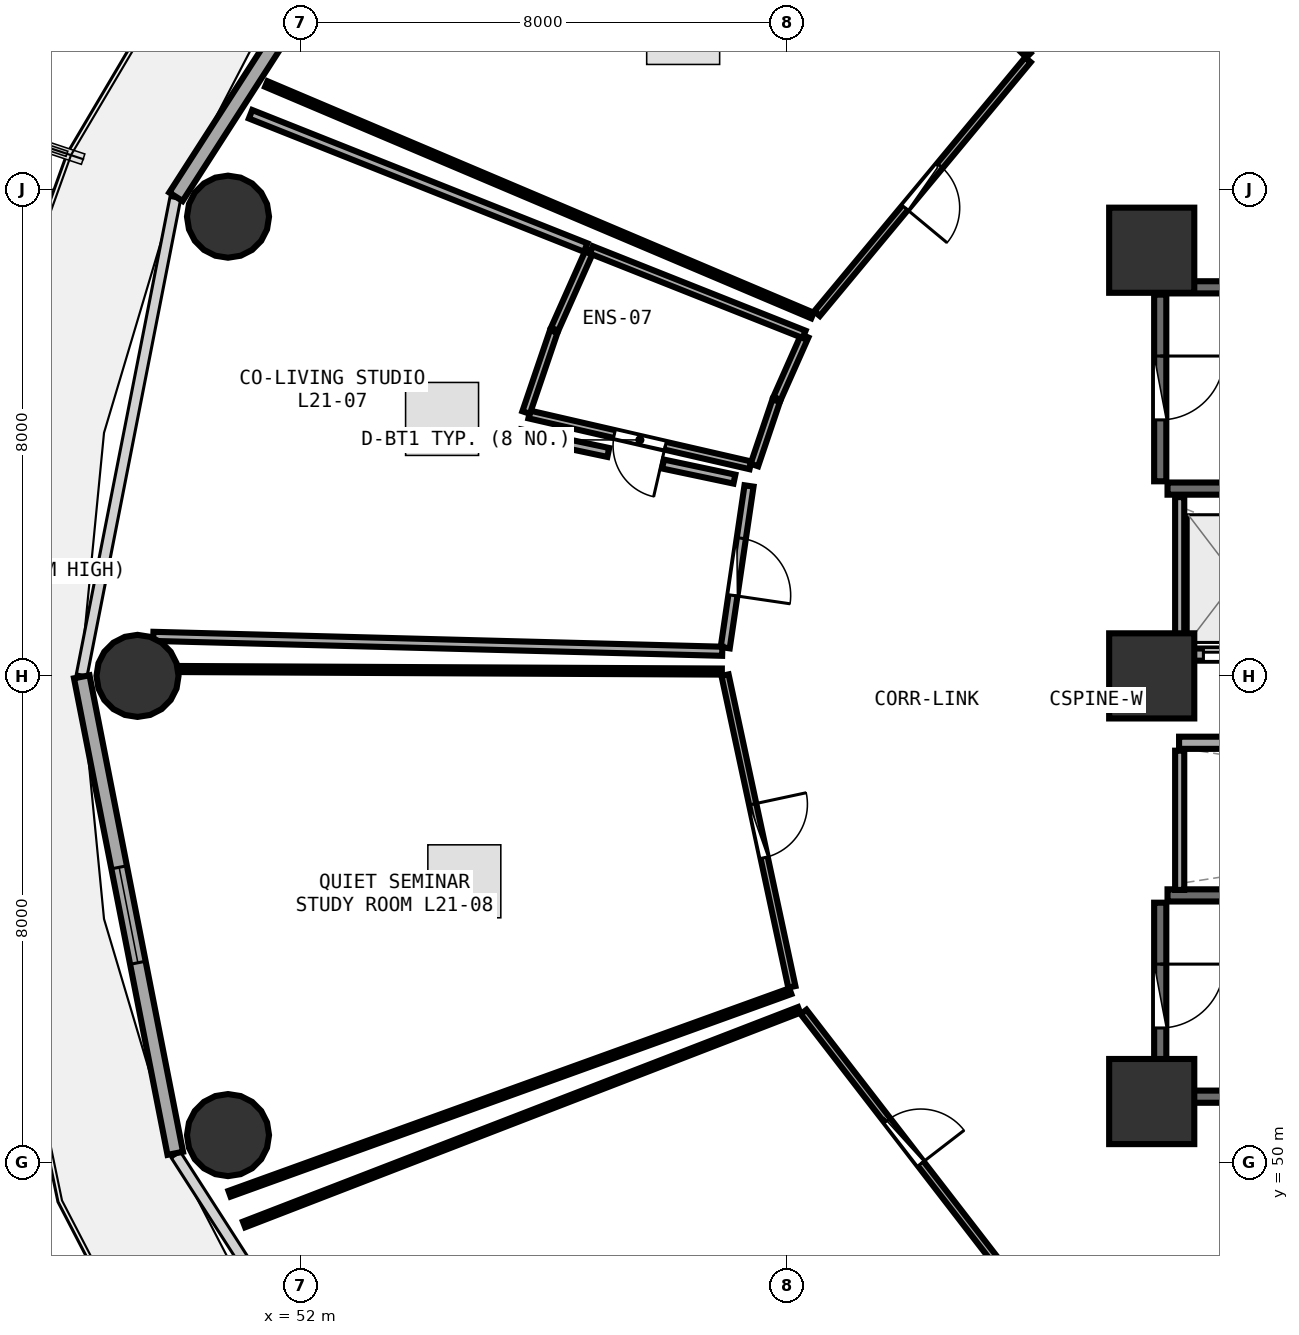
"""IFC4 building model, lengths in metres.
Left out: names, types, materials, properties, quantities, classifications, styles, units other than length and angle.
Written with IfcOpenShell. Run it as: python <this file> out.ifc"""

import sys

from ifc_helpers import new_model, si_unit, direction, frame, frame_2d, origin, origin_2d, place, context, subcontext, project, spatial, rectangle, circle, extrude, element, fill, save


model = new_model("IFC4")
c1 = context("Model", 3, precision=1e-05, world=origin(), true_north=direction((0.0, 1.0)))
c2 = subcontext(c1, "Body", "Model", "MODEL_VIEW")
j1 = project(units=[si_unit("LENGTHUNIT", "METRE"), si_unit("PLANEANGLEUNIT", "RADIAN")], contexts=[c1])
p1 = place(None, origin())
s1 = spatial("IfcSite", under=j1, at=p1, CompositionType="ELEMENT")
p2 = place(p1, origin())
s2 = spatial("IfcBuilding", under=s1, at=p2, CompositionType="ELEMENT")
p3 = place(p2, frame((0.0, 0.0, 83.85)))
s3 = spatial("IfcBuildingStorey", under=s2, at=p3, CompositionType="ELEMENT", Elevation=83.85)
for number, where, z_axis, x_axis in (
    (1, (66.0, 51.0, 0.0), (0.0, 0.0, 1.0), (1.0, 0.0, 0.0)),
    (2, (66.0, 65.0, 0.0), (0.0, 0.0, 1.0), (1.0, 0.0, 0.0)),
    (3, (66.0, 58.0, 0.0), (0.0, 0.0, 1.0), (1.0, 0.0, 0.0)),
):
    element("IfcColumn", number, at=place(p3, frame(where, z_axis=z_axis, x_axis=x_axis)), inside=s3, PredefinedType="PILASTER", context=c2, shape_type="SweptSolid", body=[
        extrude(rectangle(XDim=1.4, YDim=1.4, at=origin_2d()), origin(), (0.0, 0.0, 1.0), 3.75),
    ])
for number, where, z_axis, x_axis in (
    (4, (50.808, 65.552, 0.0), (0.0, 0.0, 1.0), (1.0, 0.0, 0.0)),
    (5, (49.32, 58.0, 0.0), (0.0, 0.0, 1.0), (1.0, 0.0, 0.0)),
    (6, (50.808, 50.448, 0.0), (0.0, 0.0, 1.0), (1.0, 0.0, 0.0)),
):
    element("IfcColumn", number, at=place(p3, frame(where, z_axis=z_axis, x_axis=x_axis)), inside=s3, PredefinedType="COLUMN", context=c2, shape_type="SweptSolid", body=[
        extrude(circle(Radius=0.675, at=origin_2d()), origin(), (0.0, 0.0, 1.0), 3.75),
    ])
p4 = place(p3, frame((54.381, 72.771, 0.0), z_axis=(0.0, 0.0, 1.0), x_axis=(-0.540620528459, -0.841266571432, 0.0)))
e7 = element("IfcWall", 7, at=p4, inside=s3, PredefinedType="SOLIDWALL", context=c2, shape_type="SweptSolid", body=[
    extrude(rectangle(XDim=8.193, YDim=0.26, at=frame_2d((4.096, 0.0))), origin(), (0.0, 0.0, 1.0), 3.475),
])
p5 = place(p4, frame((3.621, 0.0, 0.0)))
e8 = element("IfcOpeningElement", 8, at=p5, cuts=e7, PredefinedType="OPENING", context=c2, shape_type="SweptSolid", body=[
    extrude(rectangle(XDim=0.95, YDim=2.1, at=frame_2d((0.475, 1.05))), frame((0.0, 0.14, 0.0), z_axis=(0.0, -1.0, 0.0), x_axis=(1.0, 0.0, 0.0)), (0.0, 0.0, 1.0), 0.28),
])
p6 = place(p4, frame((2.041, 0.0, 0.85)))
e9 = element("IfcOpeningElement", 9, at=p6, cuts=e7, PredefinedType="OPENING", context=c2, shape_type="SweptSolid", body=[
    extrude(rectangle(XDim=1.2, YDim=1.45, at=frame_2d((0.6, 0.725))), frame((0.0, 0.14, 0.0), z_axis=(0.0, -1.0, 0.0), x_axis=(1.0, 0.0, 0.0)), (0.0, 0.0, 1.0), 0.28),
])
p7 = place(p3, frame((48.403, 57.985, 0.0), z_axis=(0.0, 0.0, 1.0), x_axis=(0.192581843632, -0.981280914674, 0.0)))
e10 = element("IfcWall", 10, at=p7, inside=s3, PredefinedType="SOLIDWALL", context=c2, shape_type="SweptSolid", body=[
    extrude(rectangle(XDim=7.987, YDim=0.26, at=frame_2d((3.993, 0.0))), origin(), (0.0, 0.0, 1.0), 3.475),
])
p8 = place(p7, frame((3.193, 0.0, 0.85)))
e11 = element("IfcOpeningElement", 11, at=p8, cuts=e10, PredefinedType="OPENING", context=c2, shape_type="SweptSolid", body=[
    extrude(rectangle(XDim=1.6, YDim=1.45, at=frame_2d((0.8, 0.725))), frame((0.0, 0.14, 0.0), z_axis=(0.0, -1.0, 0.0), x_axis=(1.0, 0.0, 0.0)), (0.0, 0.0, 1.0), 0.28),
])
for number, where, z_axis, x_axis in (
    (12, (66.26, 61.08, 0.0), (0.0, 0.0, 1.0), (1.0, 0.0, 0.0)),
    (13, (73.42, 64.39, 0.0), (0.0, 0.0, 1.0), (-1.0, 0.0, 0.0)),
):
    element("IfcWall", number, at=place(p3, frame(where, z_axis=z_axis, x_axis=x_axis)), inside=s3, PredefinedType="SHEAR", context=c2, shape_type="SweptSolid", body=[
        extrude(rectangle(XDim=7.16, YDim=0.2, at=frame_2d((3.58, 0.0))), origin(), (0.0, 0.0, 1.0), 3.49),
    ])
p9 = place(p3, frame((66.14, 64.27, 0.0), z_axis=(0.0, 0.0, 1.0), x_axis=(0.0, -1.0, 0.0)))
e14 = element("IfcWall", 14, at=p9, inside=s3, PredefinedType="SHEAR", context=c2, shape_type="SweptSolid", body=[
    extrude(rectangle(XDim=3.07, YDim=0.2, at=frame_2d((1.535, 0.0))), origin(), (0.0, 0.0, 1.0), 3.49),
])
p10 = place(p9, frame((1.01, 0.0, 0.0)))
e15 = element("IfcOpeningElement", 15, at=p10, cuts=e14, PredefinedType="OPENING", context=c2, shape_type="SweptSolid", body=[
    extrude(rectangle(XDim=1.05, YDim=2.1, at=frame_2d((0.525, 1.05))), frame((0.0, 0.11, 0.0), z_axis=(0.0, -1.0, 0.0), x_axis=(1.0, 0.0, 0.0)), (0.0, 0.0, 1.0), 0.22),
])
for number, where, z_axis, x_axis in (
    (16, (66.26, 51.08, 0.0), (0.0, 0.0, 1.0), (1.0, 0.0, 0.0)),
    (17, (73.42, 54.39, 0.0), (0.0, 0.0, 1.0), (-1.0, 0.0, 0.0)),
):
    element("IfcWall", number, at=place(p3, frame(where, z_axis=z_axis, x_axis=x_axis)), inside=s3, PredefinedType="SHEAR", context=c2, shape_type="SweptSolid", body=[
        extrude(rectangle(XDim=7.16, YDim=0.2, at=frame_2d((3.58, 0.0))), origin(), (0.0, 0.0, 1.0), 3.49),
    ])
p11 = place(p3, frame((66.14, 54.27, 0.0), z_axis=(0.0, 0.0, 1.0), x_axis=(0.0, -1.0, 0.0)))
e18 = element("IfcWall", 18, at=p11, inside=s3, PredefinedType="SHEAR", context=c2, shape_type="SweptSolid", body=[
    extrude(rectangle(XDim=3.07, YDim=0.2, at=frame_2d((1.535, 0.0))), origin(), (0.0, 0.0, 1.0), 3.49),
])
p12 = place(p11, frame((1.01, 0.0, 0.0)))
e19 = element("IfcOpeningElement", 19, at=p12, cuts=e18, PredefinedType="OPENING", context=c2, shape_type="SweptSolid", body=[
    extrude(rectangle(XDim=1.05, YDim=2.1, at=frame_2d((0.525, 1.05))), frame((0.0, 0.11, 0.0), z_axis=(0.0, -1.0, 0.0), x_axis=(1.0, 0.0, 0.0)), (0.0, 0.0, 1.0), 0.22),
])
p13 = place(p3, frame((66.45, 58.35, 0.0), z_axis=(0.0, 0.0, 1.0), x_axis=(1.0, 0.0, 0.0)))
e20 = element("IfcWall", 20, at=p13, inside=s3, PredefinedType="SOLIDWALL", context=c2, shape_type="SweptSolid", body=[
    extrude(rectangle(XDim=6.0, YDim=0.2, at=frame_2d((3.0, 0.0))), origin(), (0.0, 0.0, 1.0), 3.48),
])
p14 = place(p13, frame((0.4, 0.0, 0.0)))
e21 = element("IfcOpeningElement", 21, at=p14, cuts=e20, PredefinedType="OPENING", context=c2, shape_type="SweptSolid", body=[
    extrude(rectangle(XDim=1.1, YDim=2.1, at=frame_2d((0.55, 1.05))), frame((0.0, 0.11, 0.0), z_axis=(0.0, -1.0, 0.0), x_axis=(1.0, 0.0, 0.0)), (0.0, 0.0, 1.0), 0.22),
])
p15 = place(p13, frame((2.4, 0.0, 0.0)))
e22 = element("IfcOpeningElement", 22, at=p15, cuts=e20, PredefinedType="OPENING", context=c2, shape_type="SweptSolid", body=[
    extrude(rectangle(XDim=1.1, YDim=2.1, at=frame_2d((0.55, 1.05))), frame((0.0, 0.11, 0.0), z_axis=(0.0, -1.0, 0.0), x_axis=(1.0, 0.0, 0.0)), (0.0, 0.0, 1.0), 0.22),
])
p16 = place(p13, frame((4.4, 0.0, 0.0)))
e23 = element("IfcOpeningElement", 23, at=p16, cuts=e20, PredefinedType="OPENING", context=c2, shape_type="SweptSolid", body=[
    extrude(rectangle(XDim=1.1, YDim=2.1, at=frame_2d((0.55, 1.05))), frame((0.0, 0.11, 0.0), z_axis=(0.0, -1.0, 0.0), x_axis=(1.0, 0.0, 0.0)), (0.0, 0.0, 1.0), 0.22),
])
p17 = place(p3, frame((66.46, 58.48, 0.0), z_axis=(0.0, 0.0, 1.0), x_axis=(0.0, 1.0, 0.0)))
e24 = element("IfcWall", 24, at=p17, inside=s3, PredefinedType="PARTITIONING", context=c2, shape_type="SweptSolid", body=[
    extrude(rectangle(XDim=2.46, YDim=0.15, at=frame_2d((1.23, 0.0))), origin(), (0.0, 0.0, 1.0), 3.48),
])
p18 = place(p3, frame((66.45, 56.9, 0.0), z_axis=(0.0, 0.0, 1.0), x_axis=(1.0, 0.0, 0.0)))
e25 = element("IfcWall", 25, at=p18, inside=s3, PredefinedType="SOLIDWALL", context=c2, shape_type="SweptSolid", body=[
    extrude(rectangle(XDim=14.4, YDim=0.2, at=frame_2d((7.2, 0.0))), origin(), (0.0, 0.0, 1.0), 3.48),
])
p19 = place(p3, frame((66.46, 54.48, 0.0), z_axis=(0.0, 0.0, 1.0), x_axis=(0.0, 1.0, 0.0)))
e26 = element("IfcWall", 26, at=p19, inside=s3, PredefinedType="PARTITIONING", context=c2, shape_type="SweptSolid", body=[
    extrude(rectangle(XDim=2.29, YDim=0.15, at=frame_2d((1.145, 0.0))), origin(), (0.0, 0.0, 1.0), 3.48),
])
p20 = place(p3, frame((63.964, 68.131, 0.0), z_axis=(0.0, 0.0, 1.0), x_axis=(-0.639104047727, -0.769120287198, 0.0)))
e27 = element("IfcWall", 27, at=p20, inside=s3, PredefinedType="PARTITIONING", context=c2, shape_type="SweptSolid", body=[
    extrude(rectangle(XDim=5.427, YDim=0.12, at=frame_2d((2.713, 0.0))), origin(), (0.0, 0.0, 1.0), 2.925),
])
p21 = place(p20, frame((2.263, 0.0, 0.0)))
e28 = element("IfcOpeningElement", 28, at=p21, cuts=e27, PredefinedType="OPENING", context=c2, shape_type="SweptSolid", body=[
    extrude(rectangle(XDim=0.9, YDim=2.08, at=frame_2d((0.45, 1.04))), frame((0.0, 0.07, 0.0), z_axis=(0.0, -1.0, 0.0), x_axis=(1.0, 0.0, 0.0)), (0.0, 0.0, 1.0), 0.14),
])
p22 = place(p3, frame((59.4, 61.462, 0.0), z_axis=(0.0, 0.0, 1.0), x_axis=(-0.974573904169, 0.224066296689, 0.0)))
e29 = element("IfcWall", 29, at=p22, inside=s3, PredefinedType="PLUMBINGWALL", context=c2, shape_type="SweptSolid", body=[
    extrude(rectangle(XDim=3.732, YDim=0.13, at=frame_2d((1.866, 0.0))), origin(), (0.0, 0.0, 1.0), 3.175),
])
p23 = place(p22, frame((1.436, 0.0, 0.0)))
e30 = element("IfcOpeningElement", 30, at=p23, cuts=e29, PredefinedType="OPENING", context=c2, shape_type="SweptSolid", body=[
    extrude(rectangle(XDim=0.86, YDim=2.05, at=frame_2d((0.43, 1.025))), frame((0.0, 0.075, 0.0), z_axis=(0.0, -1.0, 0.0), x_axis=(1.0, 0.0, 0.0)), (0.0, 0.0, 1.0), 0.15),
])
p24 = place(p3, frame((59.377, 61.124, 0.0), z_axis=(0.0, 0.0, 1.0), x_axis=(-0.145640373191, -0.989337597434, 0.0)))
e31 = element("IfcWall", 31, at=p24, inside=s3, PredefinedType="PARTITIONING", context=c2, shape_type="SweptSolid", body=[
    extrude(rectangle(XDim=2.689, YDim=0.15, at=frame_2d((1.344, 0.0))), origin(), (0.0, 0.0, 1.0), 3.48),
])
p25 = place(p24, frame((0.869, 0.0, 0.0)))
e32 = element("IfcOpeningElement", 32, at=p25, cuts=e31, PredefinedType="OPENING", context=c2, shape_type="SweptSolid", body=[
    extrude(rectangle(XDim=0.95, YDim=2.08, at=frame_2d((0.475, 1.04))), frame((0.0, 0.085, 0.0), z_axis=(0.0, -1.0, 0.0), x_axis=(1.0, 0.0, 0.0)), (0.0, 0.0, 1.0), 0.17),
])
p26 = place(p3, frame((58.983, 58.012, 0.0), z_axis=(0.0, 0.0, 1.0), x_axis=(0.209586341226, -0.977790143933, 0.0)))
e33 = element("IfcWall", 33, at=p26, inside=s3, PredefinedType="PARTITIONING", context=c2, shape_type="SweptSolid", body=[
    extrude(rectangle(XDim=5.242, YDim=0.12, at=frame_2d((2.621, 0.0))), origin(), (0.0, 0.0, 1.0), 2.925),
])
p27 = place(p26, frame((2.171, 0.0, 0.0)))
e34 = element("IfcOpeningElement", 34, at=p27, cuts=e33, PredefinedType="OPENING", context=c2, shape_type="SweptSolid", body=[
    extrude(rectangle(XDim=0.9, YDim=2.08, at=frame_2d((0.45, 1.04))), frame((0.0, 0.07, 0.0), z_axis=(0.0, -1.0, 0.0), x_axis=(1.0, 0.0, 0.0)), (0.0, 0.0, 1.0), 0.14),
])
p28 = place(p3, frame((60.275, 52.473, 0.0), z_axis=(0.0, 0.0, 1.0), x_axis=(0.611167326409, -0.791501420801, 0.0)))
e35 = element("IfcWall", 35, at=p28, inside=s3, PredefinedType="PARTITIONING", context=c2, shape_type="SweptSolid", body=[
    extrude(rectangle(XDim=5.407, YDim=0.12, at=frame_2d((2.704, 0.0))), origin(), (0.0, 0.0, 1.0), 2.925),
])
p29 = place(p28, frame((2.254, 0.0, 0.0)))
e36 = element("IfcOpeningElement", 36, at=p29, cuts=e35, PredefinedType="OPENING", context=c2, shape_type="SweptSolid", body=[
    extrude(rectangle(XDim=0.9, YDim=2.08, at=frame_2d((0.45, 1.04))), frame((0.0, 0.07, 0.0), z_axis=(0.0, -1.0, 0.0), x_axis=(1.0, 0.0, 0.0)), (0.0, 0.0, 1.0), 0.14),
])
p30 = place(p3, frame((60.42, 63.927, 0.0), z_axis=(0.0, 0.0, 1.0), x_axis=(-0.920723225206, 0.390216276654, 0.0)))
e37 = element("IfcWall", 37, at=p30, inside=s3, PredefinedType="PARTITIONING", context=c2, shape_type="SweptSolid", body=[
    extrude(rectangle(XDim=9.756, YDim=0.1, at=frame_2d((4.878, 0.0))), origin(), (0.0, 0.0, 1.0), 2.925),
])
p31 = place(p3, frame((57.344, 74.756, 0.0), z_axis=(0.0, 0.0, 1.0), x_axis=(0.711285789258, -0.702902927864, 0.0)))
e38 = element("IfcWall", 38, at=p31, inside=s3, PredefinedType="PARTITIONING", context=c2, shape_type="SweptSolid", body=[
    extrude(rectangle(XDim=9.32, YDim=0.1, at=frame_2d((4.66, 0.0))), origin(), (0.0, 0.0, 1.0), 2.975),
])
p32 = place(p3, frame((60.294, 63.591, 0.0), z_axis=(0.0, 0.0, 1.0), x_axis=(-0.40547338745, -0.914106849372, 0.0)))
e39 = element("IfcWall", 39, at=p32, inside=s3, PredefinedType="PLUMBINGWALL", context=c2, shape_type="SweptSolid", body=[
    extrude(rectangle(XDim=1.124, YDim=0.13, at=frame_2d((0.562, 0.0))), origin(), (0.0, 0.0, 1.0), 3.235),
])
p33 = place(p3, frame((59.823, 62.526, 0.0), z_axis=(0.0, 0.0, 1.0), x_axis=(-0.320617291593, -0.947208821925, 0.0)))
e40 = element("IfcWall", 40, at=p33, inside=s3, PredefinedType="PLUMBINGWALL", context=c2, shape_type="SweptSolid", body=[
    extrude(rectangle(XDim=1.117, YDim=0.13, at=frame_2d((0.559, 0.0))), origin(), (0.0, 0.0, 1.0), 3.48),
])
p34 = place(p3, frame((55.711, 62.331, 0.0), z_axis=(0.0, 0.0, 1.0), x_axis=(0.322409215332, 0.946600389747, 0.0)))
e41 = element("IfcWall", 41, at=p34, inside=s3, PredefinedType="PLUMBINGWALL", context=c2, shape_type="SweptSolid", body=[
    extrude(rectangle(XDim=1.408, YDim=0.13, at=frame_2d((0.704, 0.0))), origin(), (0.0, 0.0, 1.0), 3.48),
])
p35 = place(p3, frame((56.18, 63.701, 0.0), z_axis=(0.0, 0.0, 1.0), x_axis=(0.407258007738, 0.913313152831, 0.0)))
e42 = element("IfcWall", 42, at=p35, inside=s3, PredefinedType="PLUMBINGWALL", context=c2, shape_type="SweptSolid", body=[
    extrude(rectangle(XDim=1.416, YDim=0.13, at=frame_2d((0.708, 0.0))), origin(), (0.0, 0.0, 1.0), 3.175),
])
p36 = place(p3, frame((56.784, 65.006, 0.0), z_axis=(0.0, 0.0, 1.0), x_axis=(0.929457187308, -0.368929989242, 0.0)))
e43 = element("IfcWall", 43, at=p36, inside=s3, PredefinedType="PLUMBINGWALL", context=c2, shape_type="SweptSolid", body=[
    extrude(rectangle(XDim=3.765, YDim=0.13, at=frame_2d((1.883, 0.0))), origin(), (0.0, 0.0, 1.0), 3.175),
])
p37 = place(p3, frame((58.937, 58.405, 0.0), z_axis=(0.0, 0.0, 1.0), x_axis=(-0.99965775334, 0.026160584617, 0.0)))
e44 = element("IfcWall", 44, at=p37, inside=s3, PredefinedType="PARTITIONING", context=c2, shape_type="SweptSolid", body=[
    extrude(rectangle(XDim=9.36, YDim=0.15, at=frame_2d((4.68, 0.0))), origin(), (0.0, 0.0, 1.0), 2.975),
])
p38 = place(p3, frame((51.179, 67.236, 0.0), z_axis=(0.0, 0.0, 1.0), x_axis=(0.929212756669, -0.369545197294, 0.0)))
e45 = element("IfcWall", 45, at=p38, inside=s3, PredefinedType="PARTITIONING", context=c2, shape_type="SweptSolid", body=[
    extrude(rectangle(XDim=5.933, YDim=0.15, at=frame_2d((2.966, 0.0))), origin(), (0.0, 0.0, 1.0), 2.925),
])
p39 = place(p3, frame((55.613, 61.981, 0.0), z_axis=(0.0, 0.0, 1.0), x_axis=(0.978379851426, -0.206816020472, 0.0)))
e46 = element("IfcWall", 46, at=p39, inside=s3, PredefinedType="PARTITIONING", context=c2, shape_type="SweptSolid", body=[
    extrude(rectangle(XDim=1.481, YDim=0.15, at=frame_2d((0.741, 0.0))), origin(), (0.0, 0.0, 1.0), 3.175),
])
p40 = place(p3, frame((57.963, 61.484, 0.0), z_axis=(0.0, 0.0, 1.0), x_axis=(0.978361584069, -0.20690241859, 0.0)))
e47 = element("IfcWall", 47, at=p40, inside=s3, PredefinedType="PARTITIONING", context=c2, shape_type="SweptSolid", body=[
    extrude(rectangle(XDim=1.2, YDim=0.15, at=frame_2d((0.6, 0.0))), origin(), (0.0, 0.0, 1.0), 3.48),
])
p41 = place(p3, frame((60.056, 52.814, 0.0), z_axis=(0.0, 0.0, 1.0), x_axis=(-0.940543515483, -0.339673218671, 0.0)))
e48 = element("IfcWall", 48, at=p41, inside=s3, PredefinedType="PARTITIONING", context=c2, shape_type="SweptSolid", body=[
    extrude(rectangle(XDim=9.806, YDim=0.1, at=frame_2d((4.903, 0.0))), origin(), (0.0, 0.0, 1.0), 2.925),
])
p42 = place(p3, frame((50.011, 58.113, 0.0), z_axis=(0.0, 0.0, 1.0), x_axis=(0.999989173449, -0.004653276749, 0.0)))
e49 = element("IfcWall", 49, at=p42, inside=s3, PredefinedType="PARTITIONING", context=c2, shape_type="SweptSolid", body=[
    extrude(rectangle(XDim=8.919, YDim=0.1, at=frame_2d((4.459, 0.0))), origin(), (0.0, 0.0, 1.0), 2.925),
])
p43 = place(p3, frame((51.072, 48.979, 0.0), z_axis=(0.0, 0.0, 1.0), x_axis=(0.932757339165, 0.360504849112, 0.0)))
e50 = element("IfcWall", 50, at=p43, inside=s3, PredefinedType="PARTITIONING", context=c2, shape_type="SweptSolid", body=[
    extrude(rectangle(XDim=9.786, YDim=0.1, at=frame_2d((4.893, 0.0))), origin(), (0.0, 0.0, 1.0), 2.925),
])
p44 = place(p8, origin())
e51 = element("IfcWindow", 51, at=p44, inside=s3, PartitioningType="SINGLE_PANEL", PredefinedType="WINDOW", context=c2, shape_type="SweptSolid", body=[
    extrude(rectangle(XDim=1.6, YDim=1.45, at=frame_2d((0.8, 0.725))), frame((0.0, 0.03, 0.0), z_axis=(0.0, -1.0, 0.0), x_axis=(1.0, 0.0, 0.0)), (0.0, 0.0, 1.0), 0.06),
])
fill(e11, e51)
p45 = place(p10, origin())
e52 = element("IfcDoor", 52, at=p45, inside=s3, OperationType="SINGLE_SWING_LEFT", PredefinedType="DOOR", context=c2, shape_type="SweptSolid", body=[
    extrude(rectangle(XDim=1.05, YDim=2.1, at=frame_2d((0.525, 1.05))), frame((0.0, 0.025, 0.0), z_axis=(0.0, -1.0, 0.0), x_axis=(1.0, 0.0, 0.0)), (0.0, 0.0, 1.0), 0.05),
])
fill(e15, e52)
p46 = place(p12, origin())
e53 = element("IfcDoor", 53, at=p46, inside=s3, OperationType="SINGLE_SWING_LEFT", PredefinedType="DOOR", context=c2, shape_type="SweptSolid", body=[
    extrude(rectangle(XDim=1.05, YDim=2.1, at=frame_2d((0.525, 1.05))), frame((0.0, 0.025, 0.0), z_axis=(0.0, -1.0, 0.0), x_axis=(1.0, 0.0, 0.0)), (0.0, 0.0, 1.0), 0.05),
])
fill(e19, e53)
p47 = place(p14, origin())
e54 = element("IfcDoor", 54, at=p47, inside=s3, OperationType="DOUBLE_DOOR_SLIDING", PredefinedType="DOOR", context=c2, shape_type="SweptSolid", body=[
    extrude(rectangle(XDim=1.1, YDim=2.1, at=frame_2d((0.55, 1.05))), frame((0.0, 0.025, 0.0), z_axis=(0.0, -1.0, 0.0), x_axis=(1.0, 0.0, 0.0)), (0.0, 0.0, 1.0), 0.05),
])
fill(e21, e54)
p48 = place(p21, origin())
e55 = element("IfcDoor", 55, at=p48, inside=s3, OperationType="SINGLE_SWING_RIGHT", PredefinedType="DOOR", context=c2, shape_type="SweptSolid", body=[
    extrude(rectangle(XDim=0.9, YDim=2.08, at=frame_2d((0.45, 1.04))), frame((0.0, 0.025, 0.0), z_axis=(0.0, -1.0, 0.0), x_axis=(1.0, 0.0, 0.0)), (0.0, 0.0, 1.0), 0.05),
])
fill(e28, e55)
p49 = place(p23, origin())
e56 = element("IfcDoor", 56, at=p49, inside=s3, OperationType="SINGLE_SWING_LEFT", PredefinedType="DOOR", context=c2, shape_type="SweptSolid", body=[
    extrude(rectangle(XDim=0.86, YDim=2.05, at=frame_2d((0.43, 1.025))), frame((0.0, 0.025, 0.0), z_axis=(0.0, -1.0, 0.0), x_axis=(1.0, 0.0, 0.0)), (0.0, 0.0, 1.0), 0.05),
])
fill(e30, e56)
p50 = place(p25, origin())
e57 = element("IfcDoor", 57, at=p50, inside=s3, OperationType="SINGLE_SWING_RIGHT", PredefinedType="DOOR", context=c2, shape_type="SweptSolid", body=[
    extrude(rectangle(XDim=0.95, YDim=2.08, at=frame_2d((0.475, 1.04))), frame((0.0, 0.025, 0.0), z_axis=(0.0, -1.0, 0.0), x_axis=(1.0, 0.0, 0.0)), (0.0, 0.0, 1.0), 0.05),
])
fill(e32, e57)
p51 = place(p27, origin())
e58 = element("IfcDoor", 58, at=p51, inside=s3, OperationType="SINGLE_SWING_LEFT", PredefinedType="DOOR", context=c2, shape_type="SweptSolid", body=[
    extrude(rectangle(XDim=0.9, YDim=2.08, at=frame_2d((0.45, 1.04))), frame((0.0, 0.025, 0.0), z_axis=(0.0, -1.0, 0.0), x_axis=(1.0, 0.0, 0.0)), (0.0, 0.0, 1.0), 0.05),
])
fill(e34, e58)
p52 = place(p29, origin())
e59 = element("IfcDoor", 59, at=p52, inside=s3, OperationType="SINGLE_SWING_RIGHT", PredefinedType="DOOR", context=c2, shape_type="SweptSolid", body=[
    extrude(rectangle(XDim=0.9, YDim=2.08, at=frame_2d((0.45, 1.04))), frame((0.0, 0.025, 0.0), z_axis=(0.0, -1.0, 0.0), x_axis=(1.0, 0.0, 0.0)), (0.0, 0.0, 1.0), 0.05),
])
fill(e36, e59)
save(model, sys.argv[1])
